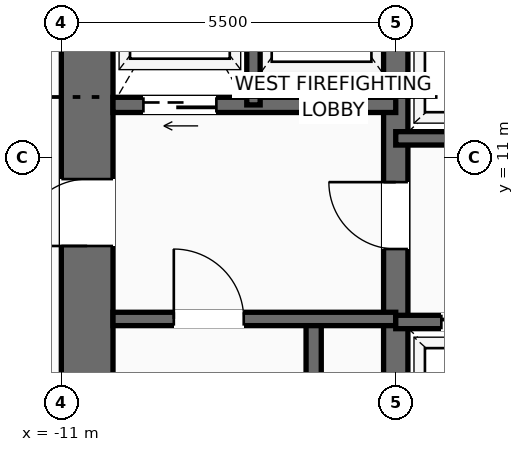
"""IFC4 building model, lengths in metres.
Left out: names, types, materials, properties, quantities, classifications, styles, units other than length and angle.
Written with IfcOpenShell. Run it as: python <this file> out.ifc"""

import sys

from ifc_helpers import new_model, si_unit, direction, frame, frame_2d, origin, place, context, subcontext, project, spatial, rectangle, extrude, source, transform, mapped, element, fill, save


model = new_model("IFC4")
c1 = context("Model", 3, precision=1e-05, world=origin(), true_north=direction((0.0, 1.0)))
c2 = subcontext(c1, "Body", "Model", "MODEL_VIEW")
j1 = project(units=[si_unit("LENGTHUNIT", "METRE"), si_unit("PLANEANGLEUNIT", "RADIAN")], contexts=[c1])
p1 = place(None, origin())
s1 = spatial("IfcSite", under=j1, at=p1, CompositionType="ELEMENT")
p2 = place(p1, origin())
s2 = spatial("IfcBuilding", under=s1, at=p2, CompositionType="ELEMENT")
p3 = place(p2, origin())
s3 = spatial("IfcBuildingStorey", under=s2, at=p3, CompositionType="ELEMENT", Elevation=0.0)
p4 = place(p3, frame((-10.575, 0.425, 0.0), z_axis=(0.0, 0.0, 1.0), x_axis=(0.0, 1.0, 0.0)))
e1 = element("IfcWall", 1, at=p4, inside=s3, PredefinedType="SHEAR", context=c2, shape_type="SweptSolid", body=[
    extrude(rectangle(XDim=15.75, YDim=0.85, at=frame_2d((7.875, 0.0))), origin(), (0.0, 0.0, 1.0), 5.15),
])
p5 = place(p4, frame((9.125, 0.0, 0.0)))
e2 = element("IfcOpeningElement", 2, at=p5, cuts=e1, PredefinedType="OPENING", context=c2, shape_type="SweptSolid", body=[
    extrude(rectangle(XDim=1.1, YDim=2.2, at=frame_2d((0.55, 1.1))), frame((0.0, 0.435, 0.0), z_axis=(0.0, -1.0, 0.0), x_axis=(1.0, 0.0, 0.0)), (0.0, 0.0, 1.0), 0.87),
])
p6 = place(p3, frame((-5.5, 0.425, 0.0), z_axis=(0.0, 0.0, 1.0), x_axis=(0.0, 1.0, 0.0)))
e3 = element("IfcWall", 3, at=p6, inside=s3, PredefinedType="SHEAR", context=c2, shape_type="SweptSolid", body=[
    extrude(rectangle(XDim=15.75, YDim=0.4, at=frame_2d((7.875, 0.0))), origin(), (0.0, 0.0, 1.0), 5.15),
])
p7 = place(p6, frame((9.075, 0.0, 0.0)))
e4 = element("IfcOpeningElement", 4, at=p7, cuts=e3, PredefinedType="OPENING", context=c2, shape_type="SweptSolid", body=[
    extrude(rectangle(XDim=1.1, YDim=2.2, at=frame_2d((0.55, 1.1))), frame((0.0, 0.21, 0.0), z_axis=(0.0, -1.0, 0.0), x_axis=(1.0, 0.0, 0.0)), (0.0, 0.0, 1.0), 0.42),
])
p8 = place(p3, frame((-6.85, 0.85, 0.0), z_axis=(0.0, 0.0, 1.0), x_axis=(0.0, 1.0, 0.0)))
e5 = element("IfcWall", 5, at=p8, inside=s3, PredefinedType="SOLIDWALL", context=c2, shape_type="SweptSolid", body=[
    extrude(rectangle(XDim=7.5, YDim=0.25, at=frame_2d((3.75, 0.0))), origin(), (0.0, 0.0, 1.0), 5.15),
])
p9 = place(p3, frame((-10.15, 8.35, 0.0), z_axis=(0.0, 0.0, 1.0), x_axis=(1.0, 0.0, 0.0)))
e6 = element("IfcWall", 6, at=p9, inside=s3, PredefinedType="SOLIDWALL", context=c2, shape_type="SweptSolid", body=[
    extrude(rectangle(XDim=4.65, YDim=0.22, at=frame_2d((2.325, 0.0))), origin(), (0.0, 0.0, 1.0), 5.15),
])
p10 = place(p9, frame((1.0, 0.0, 0.0)))
e7 = element("IfcOpeningElement", 7, at=p10, cuts=e6, PredefinedType="OPENING", context=c2, shape_type="SweptSolid", body=[
    extrude(rectangle(XDim=1.15, YDim=2.2, at=frame_2d((0.575, 1.1))), frame((0.0, 0.12, 0.0), z_axis=(0.0, -1.0, 0.0), x_axis=(1.0, 0.0, 0.0)), (0.0, 0.0, 1.0), 0.24),
])
p11 = place(p3, frame((-5.5, 11.87, 0.0), z_axis=(0.0, 0.0, 1.0), x_axis=(-1.0, 0.0, 0.0)))
e8 = element("IfcWall", 8, at=p11, inside=s3, PredefinedType="SOLIDWALL", context=c2, shape_type="SweptSolid", body=[
    extrude(rectangle(XDim=4.65, YDim=0.25, at=frame_2d((2.325, 0.0))), origin(), (0.0, 0.0, 1.0), 5.15),
])
p12 = place(p11, frame((2.95, 0.0, 0.0)))
e9 = element("IfcOpeningElement", 9, at=p12, cuts=e8, PredefinedType="OPENING", context=c2, shape_type="SweptSolid", body=[
    extrude(rectangle(XDim=1.2, YDim=2.25, at=frame_2d((0.6, 1.125))), frame((0.0, 0.135, 0.0), z_axis=(0.0, -1.0, 0.0), x_axis=(1.0, 0.0, 0.0)), (0.0, 0.0, 1.0), 0.27),
])
p13 = place(p3, frame((-7.84, 11.87, 0.0), z_axis=(0.0, 0.0, 1.0), x_axis=(0.0, 1.0, 0.0)))
e10 = element("IfcWall", 10, at=p13, inside=s3, PredefinedType="SOLIDWALL", context=c2, shape_type="SweptSolid", body=[
    extrude(rectangle(XDim=3.88, YDim=0.22, at=frame_2d((1.94, 0.0))), origin(), (0.0, 0.0, 1.0), 5.15),
])
p14 = place(p3, frame((-5.5, 8.3, 0.0), z_axis=(0.0, 0.0, 1.0), x_axis=(1.0, 0.0, 0.0)))
e11 = element("IfcWall", 11, at=p14, inside=s3, PredefinedType="SOLIDWALL", context=c2, shape_type="SweptSolid", body=[
    extrude(rectangle(XDim=7.32, YDim=0.22, at=frame_2d((3.66, 0.0))), origin(), (0.0, 0.0, 1.0), 5.15),
])
p15 = place(p14, frame((0.75, 0.0, 0.0)))
e12 = element("IfcOpeningElement", 12, at=p15, cuts=e11, PredefinedType="OPENING", context=c2, shape_type="SweptSolid", body=[
    extrude(rectangle(XDim=1.1, YDim=2.2, at=frame_2d((0.55, 1.1))), frame((0.0, 0.12, 0.0), z_axis=(0.0, -1.0, 0.0), x_axis=(1.0, 0.0, 0.0)), (0.0, 0.0, 1.0), 0.24),
])
p16 = place(p14, frame((3.15, 0.0, 0.0)))
e13 = element("IfcOpeningElement", 13, at=p16, cuts=e11, PredefinedType="OPENING", context=c2, shape_type="SweptSolid", body=[
    extrude(rectangle(XDim=1.1, YDim=2.2, at=frame_2d((0.55, 1.1))), frame((0.0, 0.12, 0.0), z_axis=(0.0, -1.0, 0.0), x_axis=(1.0, 0.0, 0.0)), (0.0, 0.0, 1.0), 0.24),
])
p17 = place(p14, frame((5.55, 0.0, 0.0)))
e14 = element("IfcOpeningElement", 14, at=p17, cuts=e11, PredefinedType="OPENING", context=c2, shape_type="SweptSolid", body=[
    extrude(rectangle(XDim=1.1, YDim=2.2, at=frame_2d((0.55, 1.1))), frame((0.0, 0.12, 0.0), z_axis=(0.0, -1.0, 0.0), x_axis=(1.0, 0.0, 0.0)), (0.0, 0.0, 1.0), 0.24),
])
p18 = place(p3, frame((-5.5, 11.32, 0.0), z_axis=(0.0, 0.0, 1.0), x_axis=(1.0, 0.0, 0.0)))
e15 = element("IfcWall", 15, at=p18, inside=s3, PredefinedType="SOLIDWALL", context=c2, shape_type="SweptSolid", body=[
    extrude(rectangle(XDim=7.32, YDim=0.22, at=frame_2d((3.66, 0.0))), origin(), (0.0, 0.0, 1.0), 5.15),
])
m1 = source(origin(), c2, "Body", "SweptSolid", [
    extrude(rectangle(XDim=1.15, YDim=2.2, at=frame_2d((0.575, 1.1))), frame((0.0, 0.025, 0.0), z_axis=(0.0, -1.0, 0.0), x_axis=(1.0, 0.0, 0.0)), (0.0, 0.0, 1.0), 0.05),
])
p19 = place(p10, origin())
e16 = element("IfcDoor", 16, at=p19, inside=s3, OperationType="SINGLE_SWING_LEFT", PredefinedType="DOOR", context=c2, shape_type="MappedRepresentation", body=[
    mapped(m1, transform((0.0, 0.0, 0.0), scale=1.0)),
])
fill(e7, e16)
m2 = source(origin(), c2, "Body", "SweptSolid", [
    extrude(rectangle(XDim=1.1, YDim=2.2, at=frame_2d((0.55, 1.1))), frame((0.0, 0.025, 0.0), z_axis=(0.0, -1.0, 0.0), x_axis=(1.0, 0.0, 0.0)), (0.0, 0.0, 1.0), 0.05),
])
p20 = place(p7, origin())
e17 = element("IfcDoor", 17, at=p20, inside=s3, OperationType="SINGLE_SWING_RIGHT", PredefinedType="DOOR", context=c2, shape_type="MappedRepresentation", body=[
    mapped(m2, transform((0.0, 0.0, 0.0), scale=1.0)),
])
fill(e4, e17)
m3 = source(origin(), c2, "Body", "SweptSolid", [
    extrude(rectangle(XDim=1.2, YDim=2.25, at=frame_2d((0.6, 1.125))), frame((0.0, 0.025, 0.0), z_axis=(0.0, -1.0, 0.0), x_axis=(1.0, 0.0, 0.0)), (0.0, 0.0, 1.0), 0.05),
])
p21 = place(p12, origin())
e18 = element("IfcDoor", 18, at=p21, inside=s3, OperationType="SLIDING_TO_LEFT", PredefinedType="DOOR", context=c2, shape_type="MappedRepresentation", body=[
    mapped(m3, transform((0.0, 0.0, 0.0), scale=1.0)),
])
fill(e9, e18)
p22 = place(p5, origin())
e19 = element("IfcDoor", 19, at=p22, inside=s3, OperationType="SINGLE_SWING_LEFT", PredefinedType="DOOR", context=c2, shape_type="MappedRepresentation", body=[
    mapped(m2, transform((0.0, 0.0, 0.0), scale=1.0)),
])
fill(e2, e19)
m4 = source(origin(), c2, "Body", "SweptSolid", [
    extrude(rectangle(XDim=1.1, YDim=2.2, at=frame_2d((0.55, 1.1))), frame((0.0, 0.025, 0.0), z_axis=(0.0, -1.0, 0.0), x_axis=(1.0, 0.0, 0.0)), (0.0, 0.0, 1.0), 0.05),
])
p23 = place(p15, origin())
e20 = element("IfcDoor", 20, at=p23, inside=s3, OperationType="SLIDING_TO_LEFT", PredefinedType="DOOR", context=c2, shape_type="MappedRepresentation", body=[
    mapped(m4, transform((0.0, 0.0, 0.0), scale=1.0)),
])
fill(e12, e20)
save(model, sys.argv[1])
